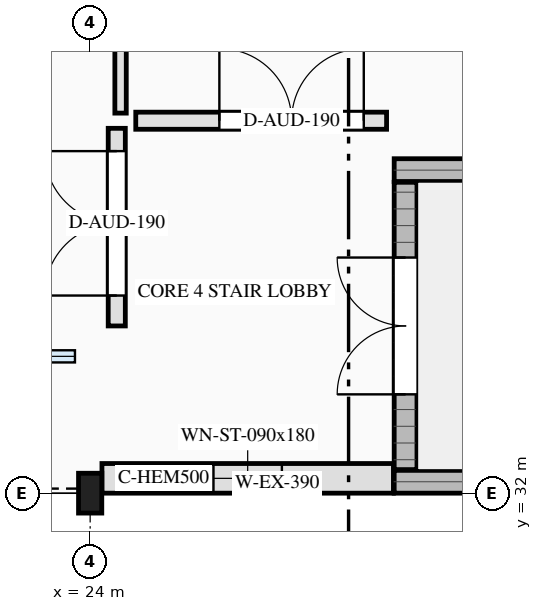
"""IFC4 building model, lengths in metres.
Left out: names, types, materials, properties, quantities, classifications, styles, units other than length and angle.
Written with IfcOpenShell. Run it as: python <this file> out.ifc"""

import sys

from ifc_helpers import new_model, si_unit, direction, frame, frame_2d, origin, origin_2d, place, context, subcontext, project, spatial, rectangle, i_section, extrude, element, fill, save


model = new_model("IFC4")
c1 = context("Model", 3, precision=1e-05, world=origin(), true_north=direction((0.0, 1.0)))
c2 = subcontext(c1, "Body", "Model", "MODEL_VIEW")
j1 = project(units=[si_unit("LENGTHUNIT", "METRE"), si_unit("PLANEANGLEUNIT", "RADIAN")], contexts=[c1])
p1 = place(None, origin())
s1 = spatial("IfcSite", under=j1, at=p1, CompositionType="ELEMENT")
p2 = place(p1, origin())
s2 = spatial("IfcBuilding", under=s1, at=p2, CompositionType="ELEMENT")
p3 = place(p2, frame((0.0, 0.0, 9.6)))
s3 = spatial("IfcBuildingStorey", under=s2, at=p3, CompositionType="ELEMENT", Elevation=9.6)
for number, where, z_axis, x_axis in (
    (1, (28.0, 32.15, 0.0), (0.0, 0.0, 1.0), (1.0, 0.0, 0.0)),
    (2, (28.0, 36.25, 0.0), (0.0, 0.0, 1.0), (1.0, 0.0, 0.0)),
):
    element("IfcWall", number, at=place(p3, frame(where, z_axis=z_axis, x_axis=x_axis)), inside=s3, PredefinedType="SHEAR", context=c2, shape_type="SweptSolid", body=[
        extrude(rectangle(XDim=10.0, YDim=0.3, at=frame_2d((5.0, 0.0))), origin(), (0.0, 0.0, 1.0), 8.0),
    ])
p4 = place(p3, frame((28.15, 32.31, 0.0), z_axis=(0.0, 0.0, 1.0), x_axis=(0.0, 1.0, 0.0)))
e3 = element("IfcWall", 3, at=p4, inside=s3, PredefinedType="SHEAR", context=c2, shape_type="SweptSolid", body=[
    extrude(rectangle(XDim=3.78, YDim=0.3, at=frame_2d((1.89, 0.0))), origin(), (0.0, 0.0, 1.0), 8.0),
])
p5 = place(p4, frame((0.99, 0.0, 0.0)))
e4 = element("IfcOpeningElement", 4, at=p5, cuts=e3, PredefinedType="OPENING", context=c2, shape_type="SweptSolid", body=[
    extrude(rectangle(XDim=1.8, YDim=2.2, at=frame_2d((0.9, 1.1))), frame((0.0, 0.16, 0.0), z_axis=(0.0, -1.0, 0.0), x_axis=(1.0, 0.0, 0.0)), (0.0, 0.0, 1.0), 0.32),
])
p6 = place(p3, frame((24.0, 32.0, 0.0), z_axis=(0.0, 0.0, 1.0), x_axis=(1.0, 0.0, 0.0)))
e5 = element("IfcColumn", 5, at=p6, inside=s3, PredefinedType="COLUMN", context=c2, shape_type="SweptSolid", body=[
    extrude(i_section(OverallWidth=0.306, OverallDepth=0.524, WebThickness=0.021, FlangeThickness=0.04, FilletRadius=0.027, at=origin_2d()), origin(), (0.0, 0.0, 1.0), 8.0),
])
p7 = place(p3, frame((27.99, 32.195, 0.0), z_axis=(0.0, 0.0, 1.0), x_axis=(-1.0, 0.0, 0.0)))
e6 = element("IfcWall", 6, at=p7, inside=s3, PredefinedType="SOLIDWALL", context=c2, shape_type="SweptSolid", body=[
    extrude(rectangle(XDim=3.835, YDim=0.39, at=frame_2d((1.917, 0.0))), origin(), (0.0, 0.0, 1.0), 6.957),
])
p8 = place(p7, frame((1.468, 0.0, 0.85)))
e7 = element("IfcOpeningElement", 7, at=p8, cuts=e6, PredefinedType="OPENING", context=c2, shape_type="SweptSolid", body=[
    extrude(rectangle(XDim=0.9, YDim=1.8, at=frame_2d((0.45, 0.9))), frame((0.0, 0.205, 0.0), z_axis=(0.0, -1.0, 0.0), x_axis=(1.0, 0.0, 0.0)), (0.0, 0.0, 1.0), 0.41),
])
p9 = place(p3, frame((24.6, 36.9, 0.0), z_axis=(0.0, 0.0, 1.0), x_axis=(1.0, 0.0, 0.0)))
e8 = element("IfcWall", 8, at=p9, inside=s3, PredefinedType="SOLIDWALL", context=c2, shape_type="SweptSolid", body=[
    extrude(rectangle(XDim=3.3, YDim=0.225, at=frame_2d((1.65, 0.0))), origin(), (0.0, 0.0, 1.0), 7.675),
])
p10 = place(p9, frame((1.1, 0.0, 0.0)))
e9 = element("IfcOpeningElement", 9, at=p10, cuts=e8, PredefinedType="OPENING", context=c2, shape_type="SweptSolid", body=[
    extrude(rectangle(XDim=1.9, YDim=2.35, at=frame_2d((0.95, 1.175))), frame((0.0, 0.123, 0.0), z_axis=(0.0, -1.0, 0.0), x_axis=(1.0, 0.0, 0.0)), (0.0, 0.0, 1.0), 0.245),
])
p11 = place(p3, frame((24.35, 34.2, 0.0), z_axis=(0.0, 0.0, 1.0), x_axis=(0.0, 1.0, 0.0)))
e10 = element("IfcWall", 10, at=p11, inside=s3, PredefinedType="SOLIDWALL", context=c2, shape_type="SweptSolid", body=[
    extrude(rectangle(XDim=2.6, YDim=0.225, at=frame_2d((1.3, 0.0))), origin(), (0.0, 0.0, 1.0), 7.675),
])
p12 = place(p11, frame((0.4, 0.0, 0.0)))
e11 = element("IfcOpeningElement", 11, at=p12, cuts=e10, PredefinedType="OPENING", context=c2, shape_type="SweptSolid", body=[
    extrude(rectangle(XDim=1.9, YDim=2.35, at=frame_2d((0.95, 1.175))), frame((0.0, 0.123, 0.0), z_axis=(0.0, -1.0, 0.0), x_axis=(1.0, 0.0, 0.0)), (0.0, 0.0, 1.0), 0.245),
])
p13 = place(p3, frame((24.4, 37.0, 0.0), z_axis=(0.0, 0.0, 1.0), x_axis=(0.0, 1.0, 0.0)))
e12 = element("IfcWall", 12, at=p13, inside=s3, PredefinedType="PARTITIONING", context=c2, shape_type="SweptSolid", body=[
    extrude(rectangle(XDim=14.8, YDim=0.15, at=frame_2d((7.4, 0.0))), origin(), (0.0, 0.0, 1.0), 7.675),
])
p14 = place(p13, frame((11.549, 0.0, 0.0)))
e13 = element("IfcOpeningElement", 13, at=p14, cuts=e12, PredefinedType="OPENING", context=c2, shape_type="SweptSolid", body=[
    extrude(rectangle(XDim=2.6, YDim=2.9, at=frame_2d((1.3, 1.45))), frame((0.0, 0.085, 0.0), z_axis=(0.0, -1.0, 0.0), x_axis=(1.0, 0.0, 0.0)), (0.0, 0.0, 1.0), 0.17),
])
p15 = place(p8, origin())
e14 = element("IfcWindow", 14, at=p15, inside=s3, PartitioningType="SINGLE_PANEL", PredefinedType="WINDOW", context=c2, shape_type="SweptSolid", body=[
    extrude(rectangle(XDim=0.9, YDim=1.8, at=frame_2d((0.45, 0.9))), frame((0.0, 0.03, 0.0), z_axis=(0.0, -1.0, 0.0), x_axis=(1.0, 0.0, 0.0)), (0.0, 0.0, 1.0), 0.06),
])
fill(e7, e14)
p16 = place(p5, origin())
e15 = element("IfcDoor", 15, at=p16, inside=s3, OperationType="DOUBLE_DOOR_SINGLE_SWING", PredefinedType="DOOR", context=c2, shape_type="SweptSolid", body=[
    extrude(rectangle(XDim=1.8, YDim=2.2, at=frame_2d((0.9, 1.1))), frame((0.0, 0.025, 0.0), z_axis=(0.0, -1.0, 0.0), x_axis=(1.0, 0.0, 0.0)), (0.0, 0.0, 1.0), 0.05),
])
fill(e4, e15)
p17 = place(p10, origin())
e16 = element("IfcDoor", 16, at=p17, inside=s3, OperationType="DOUBLE_DOOR_SINGLE_SWING", PredefinedType="DOOR", context=c2, shape_type="SweptSolid", body=[
    extrude(rectangle(XDim=1.9, YDim=2.35, at=frame_2d((0.95, 1.175))), frame((0.0, 0.025, 0.0), z_axis=(0.0, -1.0, 0.0), x_axis=(1.0, 0.0, 0.0)), (0.0, 0.0, 1.0), 0.05),
])
fill(e9, e16)
p18 = place(p12, origin())
e17 = element("IfcDoor", 17, at=p18, inside=s3, OperationType="DOUBLE_DOOR_SINGLE_SWING", PredefinedType="DOOR", context=c2, shape_type="SweptSolid", body=[
    extrude(rectangle(XDim=1.9, YDim=2.35, at=frame_2d((0.95, 1.175))), frame((0.0, 0.025, 0.0), z_axis=(0.0, -1.0, 0.0), x_axis=(1.0, 0.0, 0.0)), (0.0, 0.0, 1.0), 0.05),
])
fill(e11, e17)
save(model, sys.argv[1])
